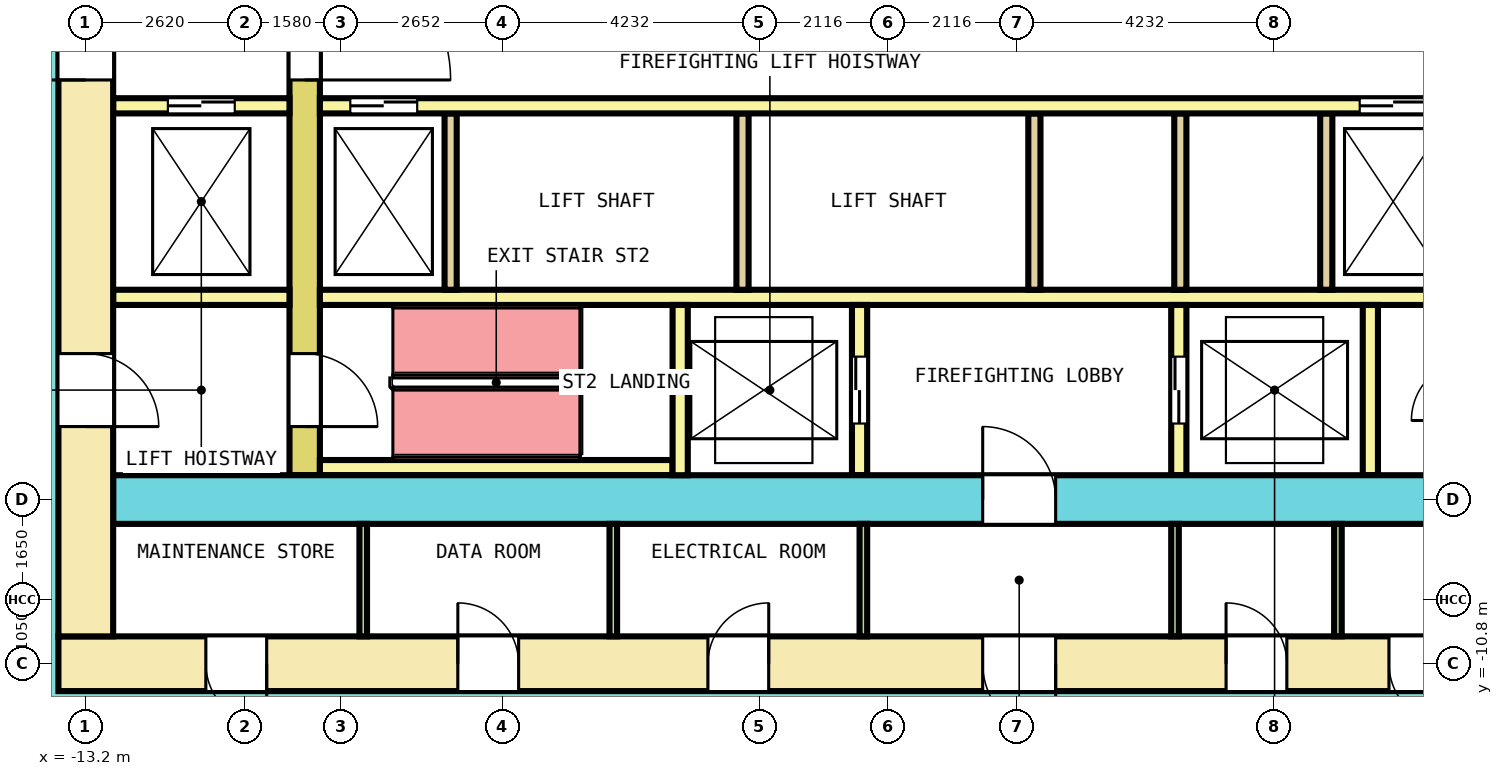
"""IFC4 building model, lengths in metres.
Left out: names, types, materials, properties, quantities, classifications, styles, units other than length and angle.
Written with IfcOpenShell. Run it as: python <this file> out.ifc"""

import sys

from ifc_helpers import new_model, si_unit, direction, frame, frame_2d, origin, place, context, subcontext, project, spatial, rectangle, extrude, element, fill, save


model = new_model("IFC4")
c1 = context("Model", 3, precision=1e-05, world=origin(), true_north=direction((0.0, 1.0)))
c2 = subcontext(c1, "Body", "Model", "MODEL_VIEW")
j1 = project(units=[si_unit("LENGTHUNIT", "METRE"), si_unit("PLANEANGLEUNIT", "RADIAN")], contexts=[c1])
p1 = place(None, origin())
s1 = spatial("IfcSite", under=j1, at=p1, CompositionType="ELEMENT")
p2 = place(p1, origin())
s2 = spatial("IfcBuilding", under=s1, at=p2, CompositionType="ELEMENT")
p3 = place(p2, frame((0.0, 0.0, 10.2)))
s3 = spatial("IfcBuildingStorey", under=s2, at=p3, CompositionType="ELEMENT", Elevation=10.2)
p4 = place(p3, frame((-13.65, -10.8, 0.0), z_axis=(0.0, 0.0, 1.0), x_axis=(1.0, 0.0, 0.0)))
e1 = element("IfcWall", 1, at=p4, inside=s3, PredefinedType="SHEAR", context=c2, shape_type="SweptSolid", body=[
    extrude(rectangle(XDim=27.3, YDim=0.9, at=frame_2d((13.65, 0.0))), origin(), (0.0, 0.0, 1.0), 4.1),
])
p5 = place(p4, frame((2.425, 0.0, 0.0)))
e2 = element("IfcOpeningElement", 2, at=p5, cuts=e1, PredefinedType="OPENING", context=c2, shape_type="SweptSolid", body=[
    extrude(rectangle(XDim=1.0, YDim=2.1, at=frame_2d((0.5, 1.05))), frame((0.0, 0.46, 0.0), z_axis=(0.0, -1.0, 0.0), x_axis=(1.0, 0.0, 0.0)), (0.0, 0.0, 1.0), 0.92),
])
p6 = place(p4, frame((6.569, 0.0, 0.0)))
e3 = element("IfcOpeningElement", 3, at=p6, cuts=e1, PredefinedType="OPENING", context=c2, shape_type="SweptSolid", body=[
    extrude(rectangle(XDim=1.0, YDim=2.1, at=frame_2d((0.5, 1.05))), frame((0.0, 0.46, 0.0), z_axis=(0.0, -1.0, 0.0), x_axis=(1.0, 0.0, 0.0)), (0.0, 0.0, 1.0), 0.92),
])
p7 = place(p4, frame((10.681, 0.0, 0.0)))
e4 = element("IfcOpeningElement", 4, at=p7, cuts=e1, PredefinedType="OPENING", context=c2, shape_type="SweptSolid", body=[
    extrude(rectangle(XDim=1.0, YDim=2.1, at=frame_2d((0.5, 1.05))), frame((0.0, 0.46, 0.0), z_axis=(0.0, -1.0, 0.0), x_axis=(1.0, 0.0, 0.0)), (0.0, 0.0, 1.0), 0.92),
])
p8 = place(p4, frame((19.202, 0.0, 0.0)))
e5 = element("IfcOpeningElement", 5, at=p8, cuts=e1, PredefinedType="OPENING", context=c2, shape_type="SweptSolid", body=[
    extrude(rectangle(XDim=1.0, YDim=2.1, at=frame_2d((0.5, 1.05))), frame((0.0, 0.46, 0.0), z_axis=(0.0, -1.0, 0.0), x_axis=(1.0, 0.0, 0.0)), (0.0, 0.0, 1.0), 0.92),
])
p9 = place(p4, frame((21.881, 0.0, 0.0)))
e6 = element("IfcOpeningElement", 6, at=p9, cuts=e1, PredefinedType="OPENING", context=c2, shape_type="SweptSolid", body=[
    extrude(rectangle(XDim=1.0, YDim=2.1, at=frame_2d((0.5, 1.05))), frame((0.0, 0.46, 0.0), z_axis=(0.0, -1.0, 0.0), x_axis=(1.0, 0.0, 0.0)), (0.0, 0.0, 1.0), 0.92),
])
p10 = place(p4, frame((24.592, 0.0, 0.0)))
e7 = element("IfcOpeningElement", 7, at=p10, cuts=e1, PredefinedType="OPENING", context=c2, shape_type="SweptSolid", body=[
    extrude(rectangle(XDim=1.0, YDim=2.1, at=frame_2d((0.5, 1.05))), frame((0.0, 0.46, 0.0), z_axis=(0.0, -1.0, 0.0), x_axis=(1.0, 0.0, 0.0)), (0.0, 0.0, 1.0), 0.92),
])
p11 = place(p4, frame((15.2, 0.0, 0.0)))
e8 = element("IfcOpeningElement", 8, at=p11, cuts=e1, PredefinedType="OPENING", context=c2, shape_type="SweptSolid", body=[
    extrude(rectangle(XDim=1.2, YDim=2.1, at=frame_2d((0.6, 1.05))), frame((0.0, 0.46, 0.0), z_axis=(0.0, -1.0, 0.0), x_axis=(1.0, 0.0, 0.0)), (0.0, 0.0, 1.0), 0.92),
])
p12 = place(p3, frame((-13.2, -10.35, 0.0), z_axis=(0.0, 0.0, 1.0), x_axis=(0.0, 1.0, 0.0)))
e9 = element("IfcWall", 9, at=p12, inside=s3, PredefinedType="SHEAR", context=c2, shape_type="SweptSolid", body=[
    extrude(rectangle(XDim=20.7, YDim=0.9, at=frame_2d((10.35, 0.0))), origin(), (0.0, 0.0, 1.0), 4.1),
])
p13 = place(p12, frame((9.15, 0.0, 0.0)))
e10 = element("IfcOpeningElement", 10, at=p13, cuts=e9, PredefinedType="OPENING", context=c2, shape_type="SweptSolid", body=[
    extrude(rectangle(XDim=2.4, YDim=2.1, at=frame_2d((1.2, 1.05))), frame((0.0, 0.46, 0.0), z_axis=(0.0, -1.0, 0.0), x_axis=(1.0, 0.0, 0.0)), (0.0, 0.0, 1.0), 0.92),
])
p14 = place(p12, frame((16.05, 0.0, 0.0)))
e11 = element("IfcOpeningElement", 11, at=p14, cuts=e9, PredefinedType="OPENING", context=c2, shape_type="SweptSolid", body=[
    extrude(rectangle(XDim=1.2, YDim=2.1, at=frame_2d((0.6, 1.05))), frame((0.0, 0.46, 0.0), z_axis=(0.0, -1.0, 0.0), x_axis=(1.0, 0.0, 0.0)), (0.0, 0.0, 1.0), 0.92),
])
p15 = place(p12, frame((3.45, 0.0, 0.0)))
e12 = element("IfcOpeningElement", 12, at=p15, cuts=e9, PredefinedType="OPENING", context=c2, shape_type="SweptSolid", body=[
    extrude(rectangle(XDim=1.2, YDim=2.1, at=frame_2d((0.6, 1.05))), frame((0.0, 0.46, 0.0), z_axis=(0.0, -1.0, 0.0), x_axis=(1.0, 0.0, 0.0)), (0.0, 0.0, 1.0), 0.92),
])
p16 = place(p3, frame((-12.75, -8.1, 0.0), z_axis=(0.0, 0.0, 1.0), x_axis=(1.0, 0.0, 0.0)))
e13 = element("IfcWall", 13, at=p16, inside=s3, PredefinedType="SHEAR", context=c2, shape_type="SweptSolid", body=[
    extrude(rectangle(XDim=25.5, YDim=0.8, at=frame_2d((12.75, 0.0))), origin(), (0.0, 0.0, 1.0), 4.1),
])
p17 = place(p16, frame((14.3, 0.0, 0.0)))
e14 = element("IfcOpeningElement", 14, at=p17, cuts=e13, PredefinedType="OPENING", context=c2, shape_type="SweptSolid", body=[
    extrude(rectangle(XDim=1.2, YDim=2.1, at=frame_2d((0.6, 1.05))), frame((0.0, 0.41, 0.0), z_axis=(0.0, -1.0, 0.0), x_axis=(1.0, 0.0, 0.0)), (0.0, 0.0, 1.0), 0.82),
])
p18 = place(p3, frame((-9.6, -7.7, 0.0), z_axis=(0.0, 0.0, 1.0), x_axis=(0.0, 1.0, 0.0)))
e15 = element("IfcWall", 15, at=p18, inside=s3, PredefinedType="SHEAR", context=c2, shape_type="SweptSolid", body=[
    extrude(rectangle(XDim=15.4, YDim=0.5, at=frame_2d((7.7, 0.0))), origin(), (0.0, 0.0, 1.0), 4.1),
])
p19 = place(p18, frame((6.5, 0.0, 0.0)))
e16 = element("IfcOpeningElement", 16, at=p19, cuts=e15, PredefinedType="OPENING", context=c2, shape_type="SweptSolid", body=[
    extrude(rectangle(XDim=2.4, YDim=2.1, at=frame_2d((1.2, 1.05))), frame((0.0, 0.26, 0.0), z_axis=(0.0, -1.0, 0.0), x_axis=(1.0, 0.0, 0.0)), (0.0, 0.0, 1.0), 0.52),
])
p20 = place(p18, frame((13.4, 0.0, 0.0)))
e17 = element("IfcOpeningElement", 17, at=p20, cuts=e15, PredefinedType="OPENING", context=c2, shape_type="SweptSolid", body=[
    extrude(rectangle(XDim=1.2, YDim=2.1, at=frame_2d((0.6, 1.05))), frame((0.0, 0.26, 0.0), z_axis=(0.0, -1.0, 0.0), x_axis=(1.0, 0.0, 0.0)), (0.0, 0.0, 1.0), 0.52),
])
p21 = place(p18, frame((0.8, 0.0, 0.0)))
e18 = element("IfcOpeningElement", 18, at=p21, cuts=e15, PredefinedType="OPENING", context=c2, shape_type="SweptSolid", body=[
    extrude(rectangle(XDim=1.2, YDim=2.1, at=frame_2d((0.6, 1.05))), frame((0.0, 0.26, 0.0), z_axis=(0.0, -1.0, 0.0), x_axis=(1.0, 0.0, 0.0)), (0.0, 0.0, 1.0), 0.52),
])
p22 = place(p3, frame((-12.75, -1.625, 0.0), z_axis=(0.0, 0.0, 1.0), x_axis=(1.0, 0.0, 0.0)))
e19 = element("IfcWall", 19, at=p22, inside=s3, PredefinedType="SOLIDWALL", context=c2, shape_type="SweptSolid", body=[
    extrude(rectangle(XDim=2.9, YDim=0.25, at=frame_2d((1.45, 0.0))), origin(), (0.0, 0.0, 1.0), 4.1),
])
p23 = place(p22, frame((0.9, 0.0, 0.0)))
e20 = element("IfcOpeningElement", 20, at=p23, cuts=e19, PredefinedType="OPENING", context=c2, shape_type="SweptSolid", body=[
    extrude(rectangle(XDim=1.1, YDim=2.1, at=frame_2d((0.55, 1.05))), frame((0.0, 0.135, 0.0), z_axis=(0.0, -1.0, 0.0), x_axis=(1.0, 0.0, 0.0)), (0.0, 0.0, 1.0), 0.27),
])
p24 = place(p3, frame((-9.35, -1.625, 0.0), z_axis=(0.0, 0.0, 1.0), x_axis=(1.0, 0.0, 0.0)))
e21 = element("IfcWall", 21, at=p24, inside=s3, PredefinedType="SOLIDWALL", context=c2, shape_type="SweptSolid", body=[
    extrude(rectangle(XDim=18.7, YDim=0.25, at=frame_2d((9.35, 0.0))), origin(), (0.0, 0.0, 1.0), 4.1),
])
p25 = place(p24, frame((0.5, 0.0, 0.0)))
e22 = element("IfcOpeningElement", 22, at=p25, cuts=e21, PredefinedType="OPENING", context=c2, shape_type="SweptSolid", body=[
    extrude(rectangle(XDim=1.1, YDim=2.1, at=frame_2d((0.55, 1.05))), frame((0.0, 0.135, 0.0), z_axis=(0.0, -1.0, 0.0), x_axis=(1.0, 0.0, 0.0)), (0.0, 0.0, 1.0), 0.27),
])
p26 = place(p24, frame((17.1, 0.0, 0.0)))
e23 = element("IfcOpeningElement", 23, at=p26, cuts=e21, PredefinedType="OPENING", context=c2, shape_type="SweptSolid", body=[
    extrude(rectangle(XDim=1.1, YDim=2.1, at=frame_2d((0.55, 1.05))), frame((0.0, 0.135, 0.0), z_axis=(0.0, -1.0, 0.0), x_axis=(1.0, 0.0, 0.0)), (0.0, 0.0, 1.0), 0.27),
])
p27 = place(p3, frame((-12.75, -4.775, 0.0), z_axis=(0.0, 0.0, 1.0), x_axis=(1.0, 0.0, 0.0)))
e24 = element("IfcWall", 24, at=p27, inside=s3, PredefinedType="SOLIDWALL", context=c2, shape_type="SweptSolid", body=[
    extrude(rectangle(XDim=2.9, YDim=0.25, at=frame_2d((1.45, 0.0))), origin(), (0.0, 0.0, 1.0), 4.1),
])
p28 = place(p3, frame((-9.35, -4.775, 0.0), z_axis=(0.0, 0.0, 1.0), x_axis=(1.0, 0.0, 0.0)))
e25 = element("IfcWall", 25, at=p28, inside=s3, PredefinedType="SOLIDWALL", context=c2, shape_type="SweptSolid", body=[
    extrude(rectangle(XDim=18.7, YDim=0.25, at=frame_2d((9.35, 0.0))), origin(), (0.0, 0.0, 1.0), 4.1),
])
for number, where, z_axis, x_axis in (
    (26, (-7.2, -4.65, 0.0), (0.0, 0.0, 1.0), (0.0, 1.0, 0.0)),
    (27, (-2.4, -4.65, 0.0), (0.0, 0.0, 1.0), (0.0, 1.0, 0.0)),
    (28, (2.4, -4.65, 0.0), (0.0, 0.0, 1.0), (0.0, 1.0, 0.0)),
    (29, (4.8, -4.65, 0.0), (0.0, 0.0, 1.0), (0.0, 1.0, 0.0)),
    (30, (7.2, -4.65, 0.0), (0.0, 0.0, 1.0), (0.0, 1.0, 0.0)),
):
    element("IfcWall", number, at=place(p3, frame(where, z_axis=z_axis, x_axis=x_axis)), inside=s3, PredefinedType="SOLIDWALL", context=c2, shape_type="SweptSolid", body=[
        extrude(rectangle(XDim=2.9, YDim=0.2, at=frame_2d((1.45, 0.0))), origin(), (0.0, 0.0, 1.0), 4.1),
    ])
p29 = place(p3, frame((-9.35, -7.575, 0.0), z_axis=(0.0, 0.0, 1.0), x_axis=(1.0, 0.0, 0.0)))
e31 = element("IfcWall", 31, at=p29, inside=s3, PredefinedType="SOLIDWALL", context=c2, shape_type="SweptSolid", body=[
    extrude(rectangle(XDim=5.8, YDim=0.25, at=frame_2d((2.9, 0.0))), origin(), (0.0, 0.0, 1.0), 4.1),
])
p30 = place(p3, frame((-3.425, -7.7, 0.0), z_axis=(0.0, 0.0, 1.0), x_axis=(0.0, 1.0, 0.0)))
e32 = element("IfcWall", 32, at=p30, inside=s3, PredefinedType="SOLIDWALL", context=c2, shape_type="SweptSolid", body=[
    extrude(rectangle(XDim=2.8, YDim=0.25, at=frame_2d((1.4, 0.0))), origin(), (0.0, 0.0, 1.0), 4.1),
])
p31 = place(p3, frame((-0.475, -7.7, 0.0), z_axis=(0.0, 0.0, 1.0), x_axis=(0.0, 1.0, 0.0)))
e33 = element("IfcWall", 33, at=p31, inside=s3, PredefinedType="SOLIDWALL", context=c2, shape_type="SweptSolid", body=[
    extrude(rectangle(XDim=2.8, YDim=0.25, at=frame_2d((1.4, 0.0))), origin(), (0.0, 0.0, 1.0), 4.1),
])
p32 = place(p31, frame((0.85, 0.0, 0.0)))
e34 = element("IfcOpeningElement", 34, at=p32, cuts=e33, PredefinedType="OPENING", context=c2, shape_type="SweptSolid", body=[
    extrude(rectangle(XDim=1.1, YDim=2.1, at=frame_2d((0.55, 1.05))), frame((0.0, 0.135, 0.0), z_axis=(0.0, -1.0, 0.0), x_axis=(1.0, 0.0, 0.0)), (0.0, 0.0, 1.0), 0.27),
])
p33 = place(p3, frame((4.775, -7.7, 0.0), z_axis=(0.0, 0.0, 1.0), x_axis=(0.0, 1.0, 0.0)))
e35 = element("IfcWall", 35, at=p33, inside=s3, PredefinedType="SOLIDWALL", context=c2, shape_type="SweptSolid", body=[
    extrude(rectangle(XDim=2.8, YDim=0.25, at=frame_2d((1.4, 0.0))), origin(), (0.0, 0.0, 1.0), 4.1),
])
p34 = place(p33, frame((0.85, 0.0, 0.0)))
e36 = element("IfcOpeningElement", 36, at=p34, cuts=e35, PredefinedType="OPENING", context=c2, shape_type="SweptSolid", body=[
    extrude(rectangle(XDim=1.1, YDim=2.1, at=frame_2d((0.55, 1.05))), frame((0.0, 0.135, 0.0), z_axis=(0.0, -1.0, 0.0), x_axis=(1.0, 0.0, 0.0)), (0.0, 0.0, 1.0), 0.27),
])
p35 = place(p3, frame((7.925, -7.7, 0.0), z_axis=(0.0, 0.0, 1.0), x_axis=(0.0, 1.0, 0.0)))
e37 = element("IfcWall", 37, at=p35, inside=s3, PredefinedType="SOLIDWALL", context=c2, shape_type="SweptSolid", body=[
    extrude(rectangle(XDim=2.8, YDim=0.25, at=frame_2d((1.4, 0.0))), origin(), (0.0, 0.0, 1.0), 4.1),
])
for number, where, z_axis, x_axis in (
    (38, (-8.637, -10.35, 0.0), (0.0, 0.0, 1.0), (0.0, 1.0, 0.0)),
    (39, (-4.525, -10.35, 0.0), (0.0, 0.0, 1.0), (0.0, 1.0, 0.0)),
    (40, (-0.413, -10.35, 0.0), (0.0, 0.0, 1.0), (0.0, 1.0, 0.0)),
    (41, (4.712, -10.35, 0.0), (0.0, 0.0, 1.0), (0.0, 1.0, 0.0)),
    (42, (7.392, -10.35, 0.0), (0.0, 0.0, 1.0), (0.0, 1.0, 0.0)),
):
    element("IfcWall", number, at=place(p3, frame(where, z_axis=z_axis, x_axis=x_axis)), inside=s3, PredefinedType="PARTITIONING", context=c2, shape_type="SweptSolid", body=[
        extrude(rectangle(XDim=1.85, YDim=0.125, at=frame_2d((0.925, 0.0))), origin(), (0.0, 0.0, 1.0), 4.1),
    ])
p36 = place(p23, origin())
e43 = element("IfcDoor", 43, at=p36, inside=s3, OperationType="DOUBLE_DOOR_SLIDING", PredefinedType="DOOR", context=c2, shape_type="SweptSolid", body=[
    extrude(rectangle(XDim=1.1, YDim=2.1, at=frame_2d((0.55, 1.05))), frame((0.0, 0.075, 0.0), z_axis=(0.0, -1.0, 0.0), x_axis=(1.0, 0.0, 0.0)), (0.0, 0.0, 1.0), 0.15),
])
fill(e20, e43)
p37 = place(p25, origin())
e44 = element("IfcDoor", 44, at=p37, inside=s3, OperationType="DOUBLE_DOOR_SLIDING", PredefinedType="DOOR", context=c2, shape_type="SweptSolid", body=[
    extrude(rectangle(XDim=1.1, YDim=2.1, at=frame_2d((0.55, 1.05))), frame((0.0, 0.075, 0.0), z_axis=(0.0, -1.0, 0.0), x_axis=(1.0, 0.0, 0.0)), (0.0, 0.0, 1.0), 0.15),
])
fill(e22, e44)
p38 = place(p26, origin())
e45 = element("IfcDoor", 45, at=p38, inside=s3, OperationType="DOUBLE_DOOR_SLIDING", PredefinedType="DOOR", context=c2, shape_type="SweptSolid", body=[
    extrude(rectangle(XDim=1.1, YDim=2.1, at=frame_2d((0.55, 1.05))), frame((0.0, 0.075, 0.0), z_axis=(0.0, -1.0, 0.0), x_axis=(1.0, 0.0, 0.0)), (0.0, 0.0, 1.0), 0.15),
])
fill(e23, e45)
p39 = place(p32, origin())
e46 = element("IfcDoor", 46, at=p39, inside=s3, OperationType="DOUBLE_DOOR_SLIDING", PredefinedType="DOOR", context=c2, shape_type="SweptSolid", body=[
    extrude(rectangle(XDim=1.1, YDim=2.1, at=frame_2d((0.55, 1.05))), frame((0.0, 0.075, 0.0), z_axis=(0.0, -1.0, 0.0), x_axis=(1.0, 0.0, 0.0)), (0.0, 0.0, 1.0), 0.15),
])
fill(e34, e46)
p40 = place(p34, origin())
e47 = element("IfcDoor", 47, at=p40, inside=s3, OperationType="DOUBLE_DOOR_SLIDING", PredefinedType="DOOR", context=c2, shape_type="SweptSolid", body=[
    extrude(rectangle(XDim=1.1, YDim=2.1, at=frame_2d((0.55, 1.05))), frame((0.0, 0.075, 0.0), z_axis=(0.0, -1.0, 0.0), x_axis=(1.0, 0.0, 0.0)), (0.0, 0.0, 1.0), 0.15),
])
fill(e36, e47)
p41 = place(p19, origin())
e48 = element("IfcDoor", 48, at=p41, inside=s3, OperationType="DOUBLE_DOOR_SINGLE_SWING", PredefinedType="DOOR", context=c2, shape_type="SweptSolid", body=[
    extrude(rectangle(XDim=2.4, YDim=2.1, at=frame_2d((1.2, 1.05))), frame((0.0, 0.2, 0.0), z_axis=(0.0, -1.0, 0.0), x_axis=(1.0, 0.0, 0.0)), (0.0, 0.0, 1.0), 0.4),
])
fill(e16, e48)
p42 = place(p13, origin())
e49 = element("IfcDoor", 49, at=p42, inside=s3, OperationType="DOUBLE_DOOR_SINGLE_SWING", PredefinedType="DOOR", context=c2, shape_type="SweptSolid", body=[
    extrude(rectangle(XDim=2.4, YDim=2.1, at=frame_2d((1.2, 1.05))), frame((0.0, 0.3, 0.0), z_axis=(0.0, -1.0, 0.0), x_axis=(1.0, 0.0, 0.0)), (0.0, 0.0, 1.0), 0.6),
])
fill(e10, e49)
p43 = place(p21, origin())
e50 = element("IfcDoor", 50, at=p43, inside=s3, OperationType="SINGLE_SWING_LEFT", PredefinedType="DOOR", context=c2, shape_type="SweptSolid", body=[
    extrude(rectangle(XDim=1.2, YDim=2.1, at=frame_2d((0.6, 1.05))), frame((0.0, 0.2, 0.0), z_axis=(0.0, -1.0, 0.0), x_axis=(1.0, 0.0, 0.0)), (0.0, 0.0, 1.0), 0.4),
])
fill(e18, e50)
p44 = place(p15, origin())
e51 = element("IfcDoor", 51, at=p44, inside=s3, OperationType="SINGLE_SWING_RIGHT", PredefinedType="DOOR", context=c2, shape_type="SweptSolid", body=[
    extrude(rectangle(XDim=1.2, YDim=2.1, at=frame_2d((0.6, 1.05))), frame((0.0, 0.3, 0.0), z_axis=(0.0, -1.0, 0.0), x_axis=(1.0, 0.0, 0.0)), (0.0, 0.0, 1.0), 0.6),
])
fill(e12, e51)
p45 = place(p17, origin())
e52 = element("IfcDoor", 52, at=p45, inside=s3, OperationType="SINGLE_SWING_LEFT", PredefinedType="DOOR", context=c2, shape_type="SweptSolid", body=[
    extrude(rectangle(XDim=1.2, YDim=2.1, at=frame_2d((0.6, 1.05))), frame((0.0, 0.3, 0.0), z_axis=(0.0, -1.0, 0.0), x_axis=(1.0, 0.0, 0.0)), (0.0, 0.0, 1.0), 0.6),
])
fill(e14, e52)
p46 = place(p5, origin())
e53 = element("IfcDoor", 53, at=p46, inside=s3, OperationType="SINGLE_SWING_RIGHT", PredefinedType="DOOR", context=c2, shape_type="SweptSolid", body=[
    extrude(rectangle(XDim=1.0, YDim=2.1, at=frame_2d((0.5, 1.05))), frame((0.0, 0.3, 0.0), z_axis=(0.0, -1.0, 0.0), x_axis=(1.0, 0.0, 0.0)), (0.0, 0.0, 1.0), 0.6),
])
fill(e2, e53)
p47 = place(p6, origin())
e54 = element("IfcDoor", 54, at=p47, inside=s3, OperationType="SINGLE_SWING_LEFT", PredefinedType="DOOR", context=c2, shape_type="SweptSolid", body=[
    extrude(rectangle(XDim=1.0, YDim=2.1, at=frame_2d((0.5, 1.05))), frame((0.0, 0.3, 0.0), z_axis=(0.0, -1.0, 0.0), x_axis=(1.0, 0.0, 0.0)), (0.0, 0.0, 1.0), 0.6),
])
fill(e3, e54)
p48 = place(p7, origin())
e55 = element("IfcDoor", 55, at=p48, inside=s3, OperationType="SINGLE_SWING_RIGHT", PredefinedType="DOOR", context=c2, shape_type="SweptSolid", body=[
    extrude(rectangle(XDim=1.0, YDim=2.1, at=frame_2d((0.5, 1.05))), frame((0.0, 0.3, 0.0), z_axis=(0.0, -1.0, 0.0), x_axis=(1.0, 0.0, 0.0)), (0.0, 0.0, 1.0), 0.6),
])
fill(e4, e55)
p49 = place(p8, origin())
e56 = element("IfcDoor", 56, at=p49, inside=s3, OperationType="SINGLE_SWING_LEFT", PredefinedType="DOOR", context=c2, shape_type="SweptSolid", body=[
    extrude(rectangle(XDim=1.0, YDim=2.1, at=frame_2d((0.5, 1.05))), frame((0.0, 0.3, 0.0), z_axis=(0.0, -1.0, 0.0), x_axis=(1.0, 0.0, 0.0)), (0.0, 0.0, 1.0), 0.6),
])
fill(e5, e56)
p50 = place(p9, origin())
e57 = element("IfcDoor", 57, at=p50, inside=s3, OperationType="SINGLE_SWING_RIGHT", PredefinedType="DOOR", context=c2, shape_type="SweptSolid", body=[
    extrude(rectangle(XDim=1.0, YDim=2.1, at=frame_2d((0.5, 1.05))), frame((0.0, 0.3, 0.0), z_axis=(0.0, -1.0, 0.0), x_axis=(1.0, 0.0, 0.0)), (0.0, 0.0, 1.0), 0.6),
])
fill(e6, e57)
p51 = place(p11, origin())
e58 = element("IfcDoor", 58, at=p51, inside=s3, OperationType="SINGLE_SWING_RIGHT", PredefinedType="DOOR", context=c2, shape_type="SweptSolid", body=[
    extrude(rectangle(XDim=1.2, YDim=2.1, at=frame_2d((0.6, 1.05))), frame((0.0, 0.3, 0.0), z_axis=(0.0, -1.0, 0.0), x_axis=(1.0, 0.0, 0.0)), (0.0, 0.0, 1.0), 0.6),
])
fill(e8, e58)
save(model, sys.argv[1])
